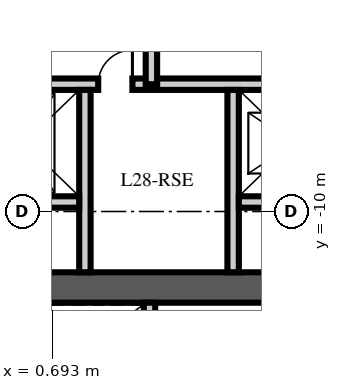
"""IFC4 building model, lengths in metres.
Left out: names, types, materials, properties, quantities, classifications, styles, units other than length and angle.
Written with IfcOpenShell. Run it as: python <this file> out.ifc"""

import sys

from ifc_helpers import new_model, si_unit, direction, frame, frame_2d, origin, place, context, subcontext, project, spatial, rectangle, extrude, element, fill, save


model = new_model("IFC4")
c1 = context("Model", 3, precision=1e-05, world=origin(), true_north=direction((0.0, 1.0)))
c2 = subcontext(c1, "Body", "Model", "MODEL_VIEW")
j1 = project(units=[si_unit("LENGTHUNIT", "METRE"), si_unit("PLANEANGLEUNIT", "RADIAN")], contexts=[c1])
p1 = place(None, origin())
s1 = spatial("IfcSite", under=j1, at=p1, CompositionType="ELEMENT")
p2 = place(p1, origin())
s2 = spatial("IfcBuilding", under=s1, at=p2, CompositionType="ELEMENT")
p3 = place(p2, frame((0.0, 0.0, 114.75)))
s3 = spatial("IfcBuildingStorey", under=s2, at=p3, CompositionType="ELEMENT", Elevation=114.75)
p4 = place(p3, frame((-15.5, -12.0, -0.25), z_axis=(0.0, 0.0, 1.0), x_axis=(1.0, 0.0, 0.0)))
e1 = element("IfcWall", 1, at=p4, inside=s3, PredefinedType="SHEAR", context=c2, shape_type="SweptSolid", body=[
    extrude(rectangle(XDim=31.0, YDim=0.8, at=frame_2d((15.5, 0.0))), origin(), (0.0, 0.0, 1.0), 3.75),
])
p5 = place(p3, frame((-8.5, -6.65, 0.0), z_axis=(0.0, 0.0, 1.0), x_axis=(1.0, 0.0, 0.0)))
e2 = element("IfcWall", 2, at=p5, inside=s3, PredefinedType="PARTITIONING", context=c2, shape_type="SweptSolid", body=[
    extrude(rectangle(XDim=17.0, YDim=0.3, at=frame_2d((8.5, 0.0))), origin(), (0.0, 0.0, 1.0), 3.5),
])
p6 = place(p5, frame((7.8, 0.0, 0.0)))
e3 = element("IfcOpeningElement", 3, at=p6, cuts=e2, PredefinedType="OPENING", context=c2, shape_type="SweptSolid", body=[
    extrude(rectangle(XDim=1.3, YDim=2.4, at=frame_2d((0.65, 1.2))), frame((0.0, 0.16, 0.0), z_axis=(0.0, -1.0, 0.0), x_axis=(1.0, 0.0, 0.0)), (0.0, 0.0, 1.0), 0.32),
])
p7 = place(p5, frame((5.65, 0.0, 0.0)))
e4 = element("IfcOpeningElement", 4, at=p7, cuts=e2, PredefinedType="OPENING", context=c2, shape_type="SweptSolid", body=[
    extrude(rectangle(XDim=0.9, YDim=2.1, at=frame_2d((0.45, 1.05))), frame((0.0, 0.16, 0.0), z_axis=(0.0, -1.0, 0.0), x_axis=(1.0, 0.0, 0.0)), (0.0, 0.0, 1.0), 0.32),
])
p8 = place(p5, frame((10.4, 0.0, 0.0)))
e5 = element("IfcOpeningElement", 5, at=p8, cuts=e2, PredefinedType="OPENING", context=c2, shape_type="SweptSolid", body=[
    extrude(rectangle(XDim=0.9, YDim=2.1, at=frame_2d((0.45, 1.05))), frame((0.0, 0.16, 0.0), z_axis=(0.0, -1.0, 0.0), x_axis=(1.0, 0.0, 0.0)), (0.0, 0.0, 1.0), 0.32),
])
for number, where, z_axis, x_axis in (
    (6, (1.55, -11.6, 0.0), (0.0, 0.0, 1.0), (0.0, 1.0, 0.0)),
    (7, (5.45, -11.6, 0.0), (0.0, 0.0, 1.0), (0.0, 1.0, 0.0)),
):
    element("IfcWall", number, at=place(p3, frame(where, z_axis=z_axis, x_axis=x_axis)), inside=s3, PredefinedType="PARTITIONING", context=c2, shape_type="SweptSolid", body=[
        extrude(rectangle(XDim=4.8, YDim=0.3, at=frame_2d((2.4, 0.0))), origin(), (0.0, 0.0, 1.0), 3.5),
    ])
for number, where, z_axis, x_axis in (
    (8, (-1.5, -9.75, 0.0), (0.0, 0.0, 1.0), (1.0, 0.0, 0.0)),
    (9, (5.6, -9.75, 0.0), (0.0, 0.0, 1.0), (1.0, 0.0, 0.0)),
):
    element("IfcWall", number, at=place(p3, frame(where, z_axis=z_axis, x_axis=x_axis)), inside=s3, PredefinedType="PARTITIONING", context=c2, shape_type="SweptSolid", body=[
        extrude(rectangle(XDim=2.9, YDim=0.3, at=frame_2d((1.45, 0.0))), origin(), (0.0, 0.0, 1.0), 3.5),
    ])
p9 = place(p3, frame((3.25, -14.5, 0.0), z_axis=(0.0, 0.0, 1.0), x_axis=(0.0, 1.0, 0.0)))
e10 = element("IfcWall", 10, at=p9, inside=s3, PredefinedType="PARTITIONING", context=c2, shape_type="SweptSolid", body=[
    extrude(rectangle(XDim=2.1, YDim=0.3, at=frame_2d((1.05, 0.0))), origin(), (0.0, 0.0, 1.0), 3.5),
])
p10 = place(p3, frame((3.3, -6.65, 0.0), z_axis=(0.0, 0.0, 1.0), x_axis=(0.0, 1.0, 0.0)))
e11 = element("IfcWall", 11, at=p10, inside=s3, PredefinedType="PARTITIONING", context=c2, shape_type="SweptSolid", body=[
    extrude(rectangle(XDim=7.45, YDim=0.3, at=frame_2d((3.725, 0.0))), origin(), (0.0, 0.0, 1.0), 3.5),
])
p11 = place(p10, frame((1.231, 0.0, 0.0)))
e12 = element("IfcOpeningElement", 12, at=p11, cuts=e11, PredefinedType="OPENING", context=c2, shape_type="SweptSolid", body=[
    extrude(rectangle(XDim=0.9, YDim=2.1, at=frame_2d((0.45, 1.05))), frame((0.0, 0.16, 0.0), z_axis=(0.0, -1.0, 0.0), x_axis=(1.0, 0.0, 0.0)), (0.0, 0.0, 1.0), 0.32),
])
p12 = place(p10, frame((4.956, 0.0, 0.0)))
e13 = element("IfcOpeningElement", 13, at=p12, cuts=e11, PredefinedType="OPENING", context=c2, shape_type="SweptSolid", body=[
    extrude(rectangle(XDim=0.9, YDim=2.1, at=frame_2d((0.45, 1.05))), frame((0.0, 0.16, 0.0), z_axis=(0.0, -1.0, 0.0), x_axis=(1.0, 0.0, 0.0)), (0.0, 0.0, 1.0), 0.32),
])
p13 = place(p8, origin())
e14 = element("IfcDoor", 14, at=p13, inside=s3, OperationType="SINGLE_SWING_RIGHT", PredefinedType="DOOR", context=c2, shape_type="SweptSolid", body=[
    extrude(rectangle(XDim=0.9, YDim=2.1, at=frame_2d((0.45, 1.05))), frame((0.0, 0.025, 0.0), z_axis=(0.0, -1.0, 0.0), x_axis=(1.0, 0.0, 0.0)), (0.0, 0.0, 1.0), 0.05),
])
fill(e5, e14)
save(model, sys.argv[1])
